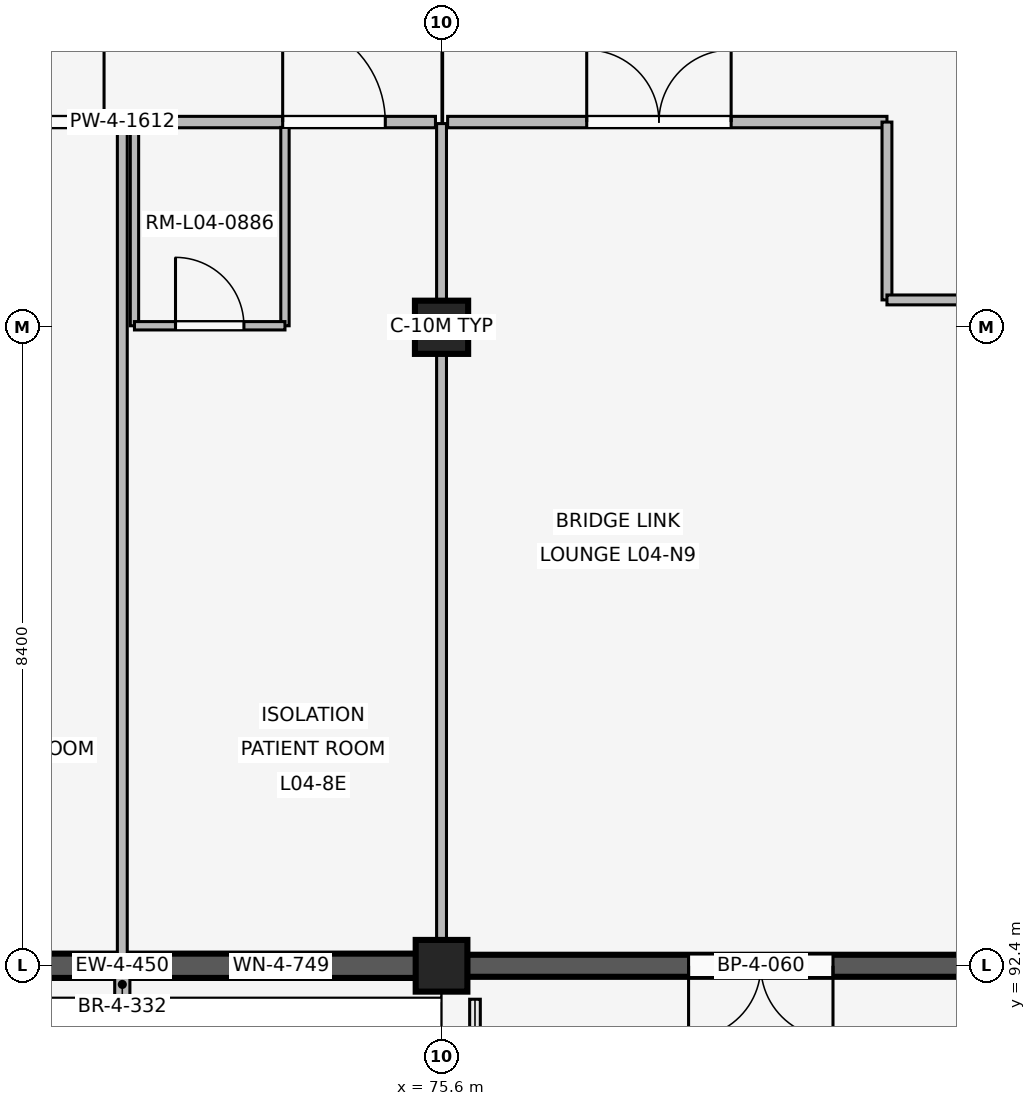
"""IFC4 building model, lengths in metres.
Left out: names, types, materials, properties, quantities, classifications, styles, units other than length and angle.
Written with IfcOpenShell. Run it as: python <this file> out.ifc"""

import sys

from ifc_helpers import new_model, si_unit, direction, frame, frame_2d, origin, origin_2d, place, context, subcontext, project, spatial, rectangle, extrude, element, fill, save


model = new_model("IFC4")
c1 = context("Model", 3, precision=1e-05, world=origin(), true_north=direction((0.0, 1.0)))
c2 = subcontext(c1, "Body", "Model", "MODEL_VIEW")
j1 = project(units=[si_unit("LENGTHUNIT", "METRE"), si_unit("PLANEANGLEUNIT", "RADIAN")], contexts=[c1])
p1 = place(None, origin())
s1 = spatial("IfcSite", under=j1, at=p1, CompositionType="ELEMENT")
p2 = place(p1, origin())
s2 = spatial("IfcBuilding", under=s1, at=p2, CompositionType="ELEMENT")
p3 = place(p2, frame((0.0, 0.0, 16.2)))
s3 = spatial("IfcBuildingStorey", under=s2, at=p3, CompositionType="ELEMENT", Elevation=16.2)
p4 = place(p3, frame((75.6, 92.4, 0.0), z_axis=(0.0, 0.0, 1.0), x_axis=(1.0, 0.0, 0.0)))
e1 = element("IfcColumn", 1, at=p4, inside=s3, PredefinedType="COLUMN", context=c2, shape_type="SweptSolid", body=[
    extrude(rectangle(XDim=0.68, YDim=0.68, at=origin_2d()), origin(), (0.0, 0.0, 1.0), 4.2),
])
p5 = place(p3, frame((75.6, 100.8, 0.0), z_axis=(0.0, 0.0, 1.0), x_axis=(1.0, 0.0, 0.0)))
e2 = element("IfcColumn", 2, at=p5, inside=s3, PredefinedType="COLUMN", context=c2, shape_type="SweptSolid", body=[
    extrude(rectangle(XDim=0.7, YDim=0.7, at=origin_2d()), origin(), (0.0, 0.0, 1.0), 4.2),
])
p6 = place(p3, frame((75.265, 92.4, 0.0), z_axis=(0.0, 0.0, 1.0), x_axis=(-1.0, 0.0, 0.0)))
e3 = element("IfcWall", 3, at=p6, inside=s3, PredefinedType="SOLIDWALL", context=c2, shape_type="SweptSolid", body=[
    extrude(rectangle(XDim=7.73, YDim=0.32, at=frame_2d((3.865, 0.0))), origin(), (0.0, 0.0, 1.0), 3.32),
])
p7 = place(p6, frame((1.453, 0.0, 0.85)))
e4 = element("IfcOpeningElement", 4, at=p7, cuts=e3, PredefinedType="OPENING", context=c2, shape_type="SweptSolid", body=[
    extrude(rectangle(XDim=0.65, YDim=1.75, at=frame_2d((0.325, 0.875))), frame((0.0, 0.17, 0.0), z_axis=(0.0, -1.0, 0.0), x_axis=(1.0, 0.0, 0.0)), (0.0, 0.0, 1.0), 0.34),
])
p8 = place(p6, frame((5.627, 0.0, 0.85)))
e5 = element("IfcOpeningElement", 5, at=p8, cuts=e3, PredefinedType="OPENING", context=c2, shape_type="SweptSolid", body=[
    extrude(rectangle(XDim=0.65, YDim=1.75, at=frame_2d((0.325, 0.875))), frame((0.0, 0.17, 0.0), z_axis=(0.0, -1.0, 0.0), x_axis=(1.0, 0.0, 0.0)), (0.0, 0.0, 1.0), 0.34),
])
p9 = place(p3, frame((71.4, 92.325, 0.0), z_axis=(0.0, 0.0, 1.0), x_axis=(0.0, -1.0, 0.0)))
e6 = element("IfcWall", 6, at=p9, inside=s3, PredefinedType="ELEMENTEDWALL", context=c2, shape_type="SweptSolid", body=[
    extrude(rectangle(XDim=0.34, YDim=0.2, at=frame_2d((0.17, 0.0))), origin(), (0.0, 0.0, 1.0), 3.3),
])
p10 = place(p3, frame((83.665, 92.4, 0.0), z_axis=(0.0, 0.0, 1.0), x_axis=(-1.0, 0.0, 0.0)))
e7 = element("IfcWall", 7, at=p10, inside=s3, PredefinedType="SOLIDWALL", context=c2, shape_type="SweptSolid", body=[
    extrude(rectangle(XDim=7.73, YDim=0.29, at=frame_2d((3.865, 0.0))), origin(), (0.0, 0.0, 1.0), 3.32),
])
p11 = place(p10, frame((2.915, 0.0, 0.0)))
e8 = element("IfcOpeningElement", 8, at=p11, cuts=e7, PredefinedType="OPENING", context=c2, shape_type="SweptSolid", body=[
    extrude(rectangle(XDim=1.9, YDim=2.4, at=frame_2d((0.95, 1.2))), frame((0.0, 0.155, 0.0), z_axis=(0.0, -1.0, 0.0), x_axis=(1.0, 0.0, 0.0)), (0.0, 0.0, 1.0), 0.31),
])
p12 = place(p3, frame((67.28, 103.5, 0.0), z_axis=(0.0, 0.0, 1.0), x_axis=(1.0, 0.0, 0.0)))
e9 = element("IfcWall", 9, at=p12, inside=s3, PredefinedType="PARTITIONING", context=c2, shape_type="SweptSolid", body=[
    extrude(rectangle(XDim=8.24, YDim=0.15, at=frame_2d((4.12, 0.0))), origin(), (0.0, 0.0, 1.0), 3.3),
])
p13 = place(p12, frame((2.53, 0.0, 0.0)))
e10 = element("IfcOpeningElement", 10, at=p13, cuts=e9, PredefinedType="OPENING", context=c2, shape_type="SweptSolid", body=[
    extrude(rectangle(XDim=1.35, YDim=2.25, at=frame_2d((0.675, 1.125))), frame((0.0, 0.085, 0.0), z_axis=(0.0, -1.0, 0.0), x_axis=(1.0, 0.0, 0.0)), (0.0, 0.0, 1.0), 0.17),
])
p14 = place(p12, frame((6.23, 0.0, 0.0)))
e11 = element("IfcOpeningElement", 11, at=p14, cuts=e9, PredefinedType="OPENING", context=c2, shape_type="SweptSolid", body=[
    extrude(rectangle(XDim=1.35, YDim=2.25, at=frame_2d((0.675, 1.125))), frame((0.0, 0.085, 0.0), z_axis=(0.0, -1.0, 0.0), x_axis=(1.0, 0.0, 0.0)), (0.0, 0.0, 1.0), 0.17),
])
p15 = place(p3, frame((71.4, 92.5, 0.0), z_axis=(0.0, 0.0, 1.0), x_axis=(0.0, 1.0, 0.0)))
e12 = element("IfcWall", 12, at=p15, inside=s3, PredefinedType="PARTITIONING", context=c2, shape_type="SweptSolid", body=[
    extrude(rectangle(XDim=10.93, YDim=0.13, at=frame_2d((5.465, 0.0))), origin(), (0.0, 0.0, 1.0), 3.3),
])
for number, where, z_axis, x_axis in (
    (13, (71.56, 100.82, 0.0), (0.0, 0.0, 1.0), (0.0, 1.0, 0.0)),
    (14, (73.54, 100.82, 0.0), (0.0, 0.0, 1.0), (0.0, 1.0, 0.0)),
):
    element("IfcWall", number, at=place(p3, frame(where, z_axis=z_axis, x_axis=x_axis)), inside=s3, PredefinedType="PARTITIONING", context=c2, shape_type="SweptSolid", body=[
        extrude(rectangle(XDim=2.61, YDim=0.11, at=frame_2d((1.305, 0.0))), origin(), (0.0, 0.0, 1.0), 3.3),
    ])
p16 = place(p3, frame((71.56, 100.82, 0.0), z_axis=(0.0, 0.0, 1.0), x_axis=(1.0, 0.0, 0.0)))
e15 = element("IfcWall", 15, at=p16, inside=s3, PredefinedType="PARTITIONING", context=c2, shape_type="SweptSolid", body=[
    extrude(rectangle(XDim=1.98, YDim=0.11, at=frame_2d((0.99, 0.0))), origin(), (0.0, 0.0, 1.0), 3.3),
])
p17 = place(p16, frame((0.54, 0.0, 0.0)))
e16 = element("IfcOpeningElement", 16, at=p17, cuts=e15, PredefinedType="OPENING", context=c2, shape_type="SweptSolid", body=[
    extrude(rectangle(XDim=0.9, YDim=2.1, at=frame_2d((0.45, 1.05))), frame((0.0, 0.065, 0.0), z_axis=(0.0, -1.0, 0.0), x_axis=(1.0, 0.0, 0.0)), (0.0, 0.0, 1.0), 0.13),
])
p18 = place(p3, frame((75.6, 92.54, 0.0), z_axis=(0.0, 0.0, 1.0), x_axis=(0.0, 1.0, 0.0)))
e17 = element("IfcWall", 17, at=p18, inside=s3, PredefinedType="PARTITIONING", context=c2, shape_type="SweptSolid", body=[
    extrude(rectangle(XDim=10.94, YDim=0.13, at=frame_2d((5.47, 0.0))), origin(), (0.0, 0.0, 1.0), 3.3),
])
p19 = place(p3, frame((75.68, 103.5, 0.0), z_axis=(0.0, 0.0, 1.0), x_axis=(1.0, 0.0, 0.0)))
e18 = element("IfcWall", 18, at=p19, inside=s3, PredefinedType="PARTITIONING", context=c2, shape_type="SweptSolid", body=[
    extrude(rectangle(XDim=5.78, YDim=0.15, at=frame_2d((2.89, 0.0))), origin(), (0.0, 0.0, 1.0), 3.3),
])
p20 = place(p19, frame((1.83, 0.0, 0.0)))
e19 = element("IfcOpeningElement", 19, at=p20, cuts=e18, PredefinedType="OPENING", context=c2, shape_type="SweptSolid", body=[
    extrude(rectangle(XDim=1.9, YDim=2.4, at=frame_2d((0.95, 1.2))), frame((0.0, 0.085, 0.0), z_axis=(0.0, -1.0, 0.0), x_axis=(1.0, 0.0, 0.0)), (0.0, 0.0, 1.0), 0.17),
])
p21 = place(p3, frame((81.46, 101.16, 0.0), z_axis=(0.0, 0.0, 1.0), x_axis=(0.0, 1.0, 0.0)))
e20 = element("IfcWall", 20, at=p21, inside=s3, PredefinedType="PARTITIONING", context=c2, shape_type="SweptSolid", body=[
    extrude(rectangle(XDim=2.34, YDim=0.13, at=frame_2d((1.17, 0.0))), origin(), (0.0, 0.0, 1.0), 3.3),
])
p22 = place(p3, frame((81.46, 101.16, 0.0), z_axis=(0.0, 0.0, 1.0), x_axis=(1.0, 0.0, 0.0)))
e21 = element("IfcWall", 21, at=p22, inside=s3, PredefinedType="PARTITIONING", context=c2, shape_type="SweptSolid", body=[
    extrude(rectangle(XDim=2.18, YDim=0.13, at=frame_2d((1.09, 0.0))), origin(), (0.0, 0.0, 1.0), 3.3),
])
p23 = place(p7, origin())
e22 = element("IfcWindow", 22, at=p23, inside=s3, PartitioningType="SINGLE_PANEL", PredefinedType="WINDOW", context=c2, shape_type="SweptSolid", body=[
    extrude(rectangle(XDim=0.65, YDim=1.75, at=frame_2d((0.325, 0.875))), frame((0.0, 0.03, 0.0), z_axis=(0.0, -1.0, 0.0), x_axis=(1.0, 0.0, 0.0)), (0.0, 0.0, 1.0), 0.06),
])
fill(e4, e22)
p24 = place(p11, origin())
e23 = element("IfcDoor", 23, at=p24, inside=s3, OperationType="DOUBLE_SWING_LEFT", PredefinedType="DOOR", context=c2, shape_type="SweptSolid", body=[
    extrude(rectangle(XDim=1.9, YDim=2.4, at=frame_2d((0.95, 1.2))), frame((0.0, 0.025, 0.0), z_axis=(0.0, -1.0, 0.0), x_axis=(1.0, 0.0, 0.0)), (0.0, 0.0, 1.0), 0.05),
])
fill(e8, e23)
p25 = place(p13, origin())
e24 = element("IfcDoor", 24, at=p25, inside=s3, OperationType="SINGLE_SWING_RIGHT", PredefinedType="DOOR", context=c2, shape_type="SweptSolid", body=[
    extrude(rectangle(XDim=1.35, YDim=2.25, at=frame_2d((0.675, 1.125))), frame((0.0, 0.025, 0.0), z_axis=(0.0, -1.0, 0.0), x_axis=(1.0, 0.0, 0.0)), (0.0, 0.0, 1.0), 0.05),
])
fill(e10, e24)
p26 = place(p14, origin())
e25 = element("IfcDoor", 25, at=p26, inside=s3, OperationType="SINGLE_SWING_LEFT", PredefinedType="DOOR", context=c2, shape_type="SweptSolid", body=[
    extrude(rectangle(XDim=1.35, YDim=2.25, at=frame_2d((0.675, 1.125))), frame((0.0, 0.025, 0.0), z_axis=(0.0, -1.0, 0.0), x_axis=(1.0, 0.0, 0.0)), (0.0, 0.0, 1.0), 0.05),
])
fill(e11, e25)
p27 = place(p17, origin())
e26 = element("IfcDoor", 26, at=p27, inside=s3, OperationType="SINGLE_SWING_LEFT", PredefinedType="DOOR", context=c2, shape_type="SweptSolid", body=[
    extrude(rectangle(XDim=0.9, YDim=2.1, at=frame_2d((0.45, 1.05))), frame((0.0, 0.025, 0.0), z_axis=(0.0, -1.0, 0.0), x_axis=(1.0, 0.0, 0.0)), (0.0, 0.0, 1.0), 0.05),
])
fill(e16, e26)
p28 = place(p20, origin())
e27 = element("IfcDoor", 27, at=p28, inside=s3, OperationType="DOUBLE_SWING_LEFT", PredefinedType="DOOR", context=c2, shape_type="SweptSolid", body=[
    extrude(rectangle(XDim=1.9, YDim=2.4, at=frame_2d((0.95, 1.2))), frame((0.0, 0.025, 0.0), z_axis=(0.0, -1.0, 0.0), x_axis=(1.0, 0.0, 0.0)), (0.0, 0.0, 1.0), 0.05),
])
fill(e19, e27)
save(model, sys.argv[1])
